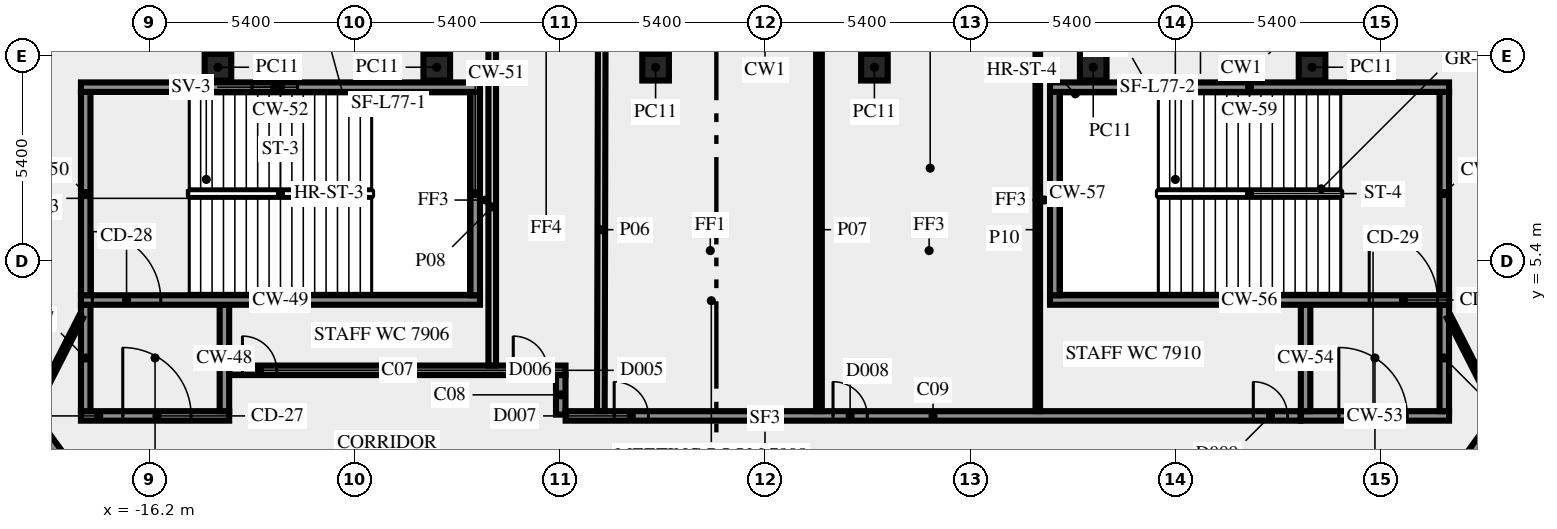
"""IFC4 building model, lengths in metres.
Left out: names, types, materials, properties, quantities, classifications, styles, units other than length and angle.
Written with IfcOpenShell. Run it as: python <this file> out.ifc"""

import sys

from ifc_helpers import new_model, si_unit, direction, frame, frame_2d, origin, origin_2d, place, context, subcontext, project, spatial, rectangle, extrude, element, fill, save


model = new_model("IFC4")
c1 = context("Model", 3, precision=1e-05, world=origin(), true_north=direction((0.0, 1.0)))
c2 = subcontext(c1, "Body", "Model", "MODEL_VIEW")
j1 = project(units=[si_unit("LENGTHUNIT", "METRE"), si_unit("PLANEANGLEUNIT", "RADIAN")], contexts=[c1])
p1 = place(None, origin())
s1 = spatial("IfcSite", under=j1, at=p1, CompositionType="ELEMENT")
p2 = place(p1, origin())
s2 = spatial("IfcBuilding", under=s1, at=p2, CompositionType="ELEMENT")
p3 = place(p2, frame((0.0, 0.0, 339.0)))
s3 = spatial("IfcBuildingStorey", under=s2, at=p3, CompositionType="ELEMENT", Elevation=339.0)
for number, where, z_axis, x_axis in (
    (1, (14.395, 10.5, 0.0), (0.0, 0.0, 1.0), (-1.0, 0.0, 0.0)),
    (2, (8.637, 10.5, 0.0), (0.0, 0.0, 1.0), (-1.0, 0.0, 0.0)),
    (3, (2.879, 10.5, 0.0), (0.0, 0.0, 1.0), (-1.0, 0.0, 0.0)),
    (4, (-2.879, 10.5, 0.0), (0.0, 0.0, 1.0), (-1.0, 0.0, 0.0)),
    (5, (-8.637, 10.5, 0.0), (0.0, 0.0, 1.0), (-1.0, 0.0, 0.0)),
    (6, (-14.395, 10.5, 0.0), (0.0, 0.0, 1.0), (-1.0, 0.0, 0.0)),
):
    element("IfcColumn", number, at=place(p3, frame(where, z_axis=z_axis, x_axis=x_axis)), inside=s3, PredefinedType="COLUMN", context=c2, shape_type="SweptSolid", body=[
        extrude(rectangle(XDim=0.7, YDim=0.7, at=origin_2d()), origin(), (0.0, 0.0, 1.0), 3.65),
    ])
p4 = place(p3, frame((-18.0, 1.325, 0.0), z_axis=(0.0, 0.0, 1.0), x_axis=(1.0, 0.0, 0.0)))
e7 = element("IfcWall", 7, at=p4, inside=s3, PredefinedType="SHEAR", context=c2, shape_type="SweptSolid", body=[
    extrude(rectangle(XDim=3.9, YDim=0.25, at=frame_2d((1.95, 0.0))), origin(), (0.0, 0.0, 1.0), 3.65),
])
p5 = place(p4, frame((1.1, 0.0, 0.0)))
e8 = element("IfcOpeningElement", 8, at=p5, cuts=e7, PredefinedType="OPENING", context=c2, shape_type="SweptSolid", body=[
    extrude(rectangle(XDim=1.8, YDim=2.1, at=frame_2d((0.9, 1.05))), frame((0.0, 0.135, 0.0), z_axis=(0.0, -1.0, 0.0), x_axis=(1.0, 0.0, 0.0)), (0.0, 0.0, 1.0), 0.27),
])
for number, where, z_axis, x_axis in (
    (9, (-17.875, 1.45, 0.0), (0.0, 0.0, 1.0), (0.0, 1.0, 0.0)),
    (10, (-14.225, 1.45, 0.0), (0.0, 0.0, 1.0), (0.0, 1.0, 0.0)),
):
    element("IfcWall", number, at=place(p3, frame(where, z_axis=z_axis, x_axis=x_axis)), inside=s3, PredefinedType="SHEAR", context=c2, shape_type="SweptSolid", body=[
        extrude(rectangle(XDim=2.8, YDim=0.25, at=frame_2d((1.4, 0.0))), origin(), (0.0, 0.0, 1.0), 3.65),
    ])
p6 = place(p3, frame((-18.0, 4.375, 0.0), z_axis=(0.0, 0.0, 1.0), x_axis=(1.0, 0.0, 0.0)))
e11 = element("IfcWall", 11, at=p6, inside=s3, PredefinedType="SHEAR", context=c2, shape_type="SweptSolid", body=[
    extrude(rectangle(XDim=10.5, YDim=0.25, at=frame_2d((5.25, 0.0))), origin(), (0.0, 0.0, 1.0), 3.65),
])
p7 = place(p6, frame((0.3, 0.0, 0.0)))
e12 = element("IfcOpeningElement", 12, at=p7, cuts=e11, PredefinedType="OPENING", context=c2, shape_type="SweptSolid", body=[
    extrude(rectangle(XDim=1.8, YDim=2.1, at=frame_2d((0.9, 1.05))), frame((0.0, 0.135, 0.0), z_axis=(0.0, -1.0, 0.0), x_axis=(1.0, 0.0, 0.0)), (0.0, 0.0, 1.0), 0.27),
])
for number, where, z_axis, x_axis in (
    (13, (-17.875, 4.5, 0.0), (0.0, 0.0, 1.0), (0.0, 1.0, 0.0)),
    (14, (-7.625, 4.5, 0.0), (0.0, 0.0, 1.0), (0.0, 1.0, 0.0)),
):
    element("IfcWall", number, at=place(p3, frame(where, z_axis=z_axis, x_axis=x_axis)), inside=s3, PredefinedType="SHEAR", context=c2, shape_type="SweptSolid", body=[
        extrude(rectangle(XDim=5.35, YDim=0.25, at=frame_2d((2.675, 0.0))), origin(), (0.0, 0.0, 1.0), 3.65),
    ])
p8 = place(p3, frame((-18.0, 9.975, 0.0), z_axis=(0.0, 0.0, 1.0), x_axis=(1.0, 0.0, 0.0)))
e15 = element("IfcWall", 15, at=p8, inside=s3, PredefinedType="SHEAR", context=c2, shape_type="SweptSolid", body=[
    extrude(rectangle(XDim=10.5, YDim=0.25, at=frame_2d((5.25, 0.0))), origin(), (0.0, 0.0, 1.0), 3.65),
])
p9 = place(p8, frame((4.5, 0.0, 1.0)))
e16 = element("IfcOpeningElement", 16, at=p9, cuts=e15, PredefinedType="OPENING", context=c2, shape_type="SweptSolid", body=[
    extrude(rectangle(XDim=1.2, YDim=1.2, at=frame_2d((0.6, 0.6))), frame((0.0, 0.135, 0.0), z_axis=(0.0, -1.0, 0.0), x_axis=(1.0, 0.0, 0.0)), (0.0, 0.0, 1.0), 0.27),
])
p10 = place(p3, frame((14.1, 1.325, 0.0), z_axis=(0.0, 0.0, 1.0), x_axis=(1.0, 0.0, 0.0)))
e17 = element("IfcWall", 17, at=p10, inside=s3, PredefinedType="SHEAR", context=c2, shape_type="SweptSolid", body=[
    extrude(rectangle(XDim=3.9, YDim=0.25, at=frame_2d((1.95, 0.0))), origin(), (0.0, 0.0, 1.0), 3.65),
])
p11 = place(p10, frame((1.0, 0.0, 0.0)))
e18 = element("IfcOpeningElement", 18, at=p11, cuts=e17, PredefinedType="OPENING", context=c2, shape_type="SweptSolid", body=[
    extrude(rectangle(XDim=1.8, YDim=2.1, at=frame_2d((0.9, 1.05))), frame((0.0, 0.135, 0.0), z_axis=(0.0, -1.0, 0.0), x_axis=(1.0, 0.0, 0.0)), (0.0, 0.0, 1.0), 0.27),
])
for number, where, z_axis, x_axis in (
    (19, (14.225, 1.45, 0.0), (0.0, 0.0, 1.0), (0.0, 1.0, 0.0)),
    (20, (17.875, 1.45, 0.0), (0.0, 0.0, 1.0), (0.0, 1.0, 0.0)),
):
    element("IfcWall", number, at=place(p3, frame(where, z_axis=z_axis, x_axis=x_axis)), inside=s3, PredefinedType="SHEAR", context=c2, shape_type="SweptSolid", body=[
        extrude(rectangle(XDim=2.8, YDim=0.25, at=frame_2d((1.4, 0.0))), origin(), (0.0, 0.0, 1.0), 3.65),
    ])
p12 = place(p3, frame((7.5, 4.375, 0.0), z_axis=(0.0, 0.0, 1.0), x_axis=(1.0, 0.0, 0.0)))
e21 = element("IfcWall", 21, at=p12, inside=s3, PredefinedType="SHEAR", context=c2, shape_type="SweptSolid", body=[
    extrude(rectangle(XDim=10.5, YDim=0.25, at=frame_2d((5.25, 0.0))), origin(), (0.0, 0.0, 1.0), 3.65),
])
p13 = place(p12, frame((8.4, 0.0, 0.0)))
e22 = element("IfcOpeningElement", 22, at=p13, cuts=e21, PredefinedType="OPENING", context=c2, shape_type="SweptSolid", body=[
    extrude(rectangle(XDim=1.8, YDim=2.1, at=frame_2d((0.9, 1.05))), frame((0.0, 0.135, 0.0), z_axis=(0.0, -1.0, 0.0), x_axis=(1.0, 0.0, 0.0)), (0.0, 0.0, 1.0), 0.27),
])
for number, where, z_axis, x_axis in (
    (23, (7.625, 4.5, 0.0), (0.0, 0.0, 1.0), (0.0, 1.0, 0.0)),
    (24, (17.875, 4.5, 0.0), (0.0, 0.0, 1.0), (0.0, 1.0, 0.0)),
):
    element("IfcWall", number, at=place(p3, frame(where, z_axis=z_axis, x_axis=x_axis)), inside=s3, PredefinedType="SHEAR", context=c2, shape_type="SweptSolid", body=[
        extrude(rectangle(XDim=5.35, YDim=0.25, at=frame_2d((2.675, 0.0))), origin(), (0.0, 0.0, 1.0), 3.65),
    ])
p14 = place(p3, frame((7.5, 9.975, 0.0), z_axis=(0.0, 0.0, 1.0), x_axis=(1.0, 0.0, 0.0)))
e25 = element("IfcWall", 25, at=p14, inside=s3, PredefinedType="SHEAR", context=c2, shape_type="SweptSolid", body=[
    extrude(rectangle(XDim=10.5, YDim=0.25, at=frame_2d((5.25, 0.0))), origin(), (0.0, 0.0, 1.0), 3.65),
])
p15 = place(p14, frame((2.0, 0.0, 1.0)))
e26 = element("IfcOpeningElement", 26, at=p15, cuts=e25, PredefinedType="OPENING", context=c2, shape_type="SweptSolid", body=[
    extrude(rectangle(XDim=1.2, YDim=1.2, at=frame_2d((0.6, 0.6))), frame((0.0, 0.135, 0.0), z_axis=(0.0, -1.0, 0.0), x_axis=(1.0, 0.0, 0.0)), (0.0, 0.0, 1.0), 0.27),
])
p16 = place(p3, frame((17.545, -1.125, 0.0), z_axis=(0.0, 0.0, 1.0), x_axis=(0.58779555165, 0.809009511354, 0.0)))
e27 = element("IfcWall", 27, at=p16, inside=s3, PredefinedType="SOLIDWALL", context=c2, shape_type="SweptSolid", body=[
    extrude(rectangle(XDim=18.103, YDim=0.25, at=frame_2d((9.052, 0.0))), origin(), (0.0, 0.0, 1.0), 3.65),
])
p17 = place(p16, frame((16.728, 0.0, 0.0)))
e28 = element("IfcOpeningElement", 28, at=p17, cuts=e27, PredefinedType="OPENING", context=c2, shape_type="SweptSolid", body=[
    extrude(rectangle(XDim=0.9, YDim=2.1, at=frame_2d((0.45, 1.05))), frame((0.0, 0.135, 0.0), z_axis=(0.0, -1.0, 0.0), x_axis=(1.0, 0.0, 0.0)), (0.0, 0.0, 1.0), 0.27),
])
p18 = place(p3, frame((-28.039, 13.319, 0.0), z_axis=(0.0, 0.0, 1.0), x_axis=(0.587791911753, -0.809012155952, 0.0)))
e29 = element("IfcWall", 29, at=p18, inside=s3, PredefinedType="SOLIDWALL", context=c2, shape_type="SweptSolid", body=[
    extrude(rectangle(XDim=17.853, YDim=0.25, at=frame_2d((8.927, 0.0))), origin(), (0.0, 0.0, 1.0), 3.65),
])
p19 = place(p18, frame((0.225, 0.0, 0.0)))
e30 = element("IfcOpeningElement", 30, at=p19, cuts=e29, PredefinedType="OPENING", context=c2, shape_type="SweptSolid", body=[
    extrude(rectangle(XDim=0.9, YDim=2.1, at=frame_2d((0.45, 1.05))), frame((0.0, 0.135, 0.0), z_axis=(0.0, -1.0, 0.0), x_axis=(1.0, 0.0, 0.0)), (0.0, 0.0, 1.0), 0.27),
])
p20 = place(p3, frame((-14.09, 2.525, 0.0), z_axis=(0.0, 0.0, 1.0), x_axis=(1.0, 0.0, 0.0)))
e31 = element("IfcWall", 31, at=p20, inside=s3, PredefinedType="SOLIDWALL", context=c2, shape_type="SweptSolid", body=[
    extrude(rectangle(XDim=8.84, YDim=0.25, at=frame_2d((4.42, 0.0))), origin(), (0.0, 0.0, 1.0), 3.65),
])
p21 = place(p20, frame((7.466, 0.0, 0.0)))
e32 = element("IfcOpeningElement", 32, at=p21, cuts=e31, PredefinedType="OPENING", context=c2, shape_type="SweptSolid", body=[
    extrude(rectangle(XDim=0.9, YDim=2.1, at=frame_2d((0.45, 1.05))), frame((0.0, 0.135, 0.0), z_axis=(0.0, -1.0, 0.0), x_axis=(1.0, 0.0, 0.0)), (0.0, 0.0, 1.0), 0.27),
])
p22 = place(p20, frame((0.34, 0.0, 0.0)))
e33 = element("IfcOpeningElement", 33, at=p22, cuts=e31, PredefinedType="OPENING", context=c2, shape_type="SweptSolid", body=[
    extrude(rectangle(XDim=0.9, YDim=2.1, at=frame_2d((0.45, 1.05))), frame((0.0, 0.135, 0.0), z_axis=(0.0, -1.0, 0.0), x_axis=(1.0, 0.0, 0.0)), (0.0, 0.0, 1.0), 0.27),
])
p23 = place(p3, frame((-5.375, 2.4, 0.0), z_axis=(0.0, 0.0, 1.0), x_axis=(0.0, -1.0, 0.0)))
e34 = element("IfcWall", 34, at=p23, inside=s3, PredefinedType="SOLIDWALL", context=c2, shape_type="SweptSolid", body=[
    extrude(rectangle(XDim=1.041, YDim=0.25, at=frame_2d((0.521, 0.0))), origin(), (0.0, 0.0, 1.0), 3.65),
])
p24 = place(p3, frame((-5.246, 1.325, 0.0), z_axis=(0.0, 0.0, 1.0), x_axis=(1.0, 0.0, 0.0)))
e35 = element("IfcWall", 35, at=p24, inside=s3, PredefinedType="SOLIDWALL", context=c2, shape_type="SweptSolid", body=[
    extrude(rectangle(XDim=19.336, YDim=0.25, at=frame_2d((9.668, 0.0))), origin(), (0.0, 0.0, 1.0), 3.65),
])
p25 = place(p24, frame((1.277, 0.0, 0.0)))
e36 = element("IfcOpeningElement", 36, at=p25, cuts=e35, PredefinedType="OPENING", context=c2, shape_type="SweptSolid", body=[
    extrude(rectangle(XDim=0.9, YDim=2.1, at=frame_2d((0.45, 1.05))), frame((0.0, 0.135, 0.0), z_axis=(0.0, -1.0, 0.0), x_axis=(1.0, 0.0, 0.0)), (0.0, 0.0, 1.0), 0.27),
])
p26 = place(p24, frame((7.036, 0.0, 0.0)))
e37 = element("IfcOpeningElement", 37, at=p26, cuts=e35, PredefinedType="OPENING", context=c2, shape_type="SweptSolid", body=[
    extrude(rectangle(XDim=0.9, YDim=2.1, at=frame_2d((0.45, 1.05))), frame((0.0, 0.135, 0.0), z_axis=(0.0, -1.0, 0.0), x_axis=(1.0, 0.0, 0.0)), (0.0, 0.0, 1.0), 0.27),
])
p27 = place(p24, frame((18.096, 0.0, 0.0)))
e38 = element("IfcOpeningElement", 38, at=p27, cuts=e35, PredefinedType="OPENING", context=c2, shape_type="SweptSolid", body=[
    extrude(rectangle(XDim=0.9, YDim=2.1, at=frame_2d((0.45, 1.05))), frame((0.0, 0.135, 0.0), z_axis=(0.0, -1.0, 0.0), x_axis=(1.0, 0.0, 0.0)), (0.0, 0.0, 1.0), 0.27),
])
p28 = place(p3, frame((-4.296, 11.0, 0.0), z_axis=(0.0, 0.0, 1.0), x_axis=(-0.002377476217, -0.999997173799, 0.0)))
e39 = element("IfcWall", 39, at=p28, inside=s3, PredefinedType="SOLIDWALL", context=c2, shape_type="SweptSolid", body=[
    extrude(rectangle(XDim=9.55, YDim=0.2, at=frame_2d((4.775, 0.0))), origin(), (0.0, 0.0, 1.0), 2.95),
])
p29 = place(p3, frame((1.42, 1.45, 0.0), z_axis=(0.0, 0.0, 1.0), x_axis=(0.0, 1.0, 0.0)))
e40 = element("IfcWall", 40, at=p29, inside=s3, PredefinedType="PARTITIONING", context=c2, shape_type="SweptSolid", body=[
    extrude(rectangle(XDim=9.55, YDim=0.15, at=frame_2d((4.775, 0.0))), origin(), (0.0, 0.0, 1.0), 2.95),
])
p30 = place(p3, frame((-7.178, 11.0, 0.0), z_axis=(0.0, 0.0, 1.0), x_axis=(0.0, -1.0, 0.0)))
e41 = element("IfcWall", 41, at=p30, inside=s3, PredefinedType="SOLIDWALL", context=c2, shape_type="SweptSolid", body=[
    extrude(rectangle(XDim=8.35, YDim=0.2, at=frame_2d((4.175, 0.0))), origin(), (0.0, 0.0, 1.0), 2.95),
])
p31 = place(p3, frame((7.178, 1.45, 0.0), z_axis=(0.0, 0.0, 1.0), x_axis=(0.0, 1.0, 0.0)))
e42 = element("IfcWall", 42, at=p31, inside=s3, PredefinedType="PARTITIONING", context=c2, shape_type="SweptSolid", body=[
    extrude(rectangle(XDim=9.55, YDim=0.12, at=frame_2d((4.775, 0.0))), origin(), (0.0, 0.0, 1.0), 2.95),
])
for number, where, z_axis, x_axis in (
    (43, (18.0, 3.925, 0.0), (0.0, 0.0, 1.0), (0.454, -0.891, 0.0)),
    (44, (-19.261, 1.45, 0.0), (0.0, 0.0, 1.0), (0.454, 0.891, 0.0)),
):
    element("IfcWall", number, at=place(p3, frame(where, z_axis=z_axis, x_axis=x_axis)), inside=s3, PredefinedType="PARTITIONING", context=c2, shape_type="SweptSolid", body=[
        extrude(rectangle(XDim=2.778, YDim=0.12, at=frame_2d((1.389, 0.0))), origin(), (0.0, 0.0, 1.0), 3.65),
    ])
p32 = place(p5, origin())
e45 = element("IfcDoor", 45, at=p32, inside=s3, OperationType="DOUBLE_DOOR_SINGLE_SWING", PredefinedType="DOOR", context=c2, shape_type="SweptSolid", body=[
    extrude(rectangle(XDim=1.8, YDim=2.1, at=frame_2d((0.9, 1.05))), frame((0.0, 0.025, 0.0), z_axis=(0.0, -1.0, 0.0), x_axis=(1.0, 0.0, 0.0)), (0.0, 0.0, 1.0), 0.05),
])
fill(e8, e45)
p33 = place(p7, origin())
e46 = element("IfcDoor", 46, at=p33, inside=s3, OperationType="DOUBLE_DOOR_SINGLE_SWING", PredefinedType="DOOR", context=c2, shape_type="SweptSolid", body=[
    extrude(rectangle(XDim=1.8, YDim=2.1, at=frame_2d((0.9, 1.05))), frame((0.0, 0.025, 0.0), z_axis=(0.0, -1.0, 0.0), x_axis=(1.0, 0.0, 0.0)), (0.0, 0.0, 1.0), 0.05),
])
fill(e12, e46)
p34 = place(p9, origin())
e47 = element("IfcWindow", 47, at=p34, inside=s3, PartitioningType="SINGLE_PANEL", PredefinedType="WINDOW", context=c2, shape_type="SweptSolid", body=[
    extrude(rectangle(XDim=1.2, YDim=1.2, at=frame_2d((0.6, 0.6))), frame((0.0, 0.03, 0.0), z_axis=(0.0, -1.0, 0.0), x_axis=(1.0, 0.0, 0.0)), (0.0, 0.0, 1.0), 0.06),
])
fill(e16, e47)
p35 = place(p11, origin())
e48 = element("IfcDoor", 48, at=p35, inside=s3, OperationType="DOUBLE_DOOR_SINGLE_SWING", PredefinedType="DOOR", context=c2, shape_type="SweptSolid", body=[
    extrude(rectangle(XDim=1.8, YDim=2.1, at=frame_2d((0.9, 1.05))), frame((0.0, 0.025, 0.0), z_axis=(0.0, -1.0, 0.0), x_axis=(1.0, 0.0, 0.0)), (0.0, 0.0, 1.0), 0.05),
])
fill(e18, e48)
p36 = place(p13, origin())
e49 = element("IfcDoor", 49, at=p36, inside=s3, OperationType="DOUBLE_DOOR_SINGLE_SWING", PredefinedType="DOOR", context=c2, shape_type="SweptSolid", body=[
    extrude(rectangle(XDim=1.8, YDim=2.1, at=frame_2d((0.9, 1.05))), frame((0.0, 0.025, 0.0), z_axis=(0.0, -1.0, 0.0), x_axis=(1.0, 0.0, 0.0)), (0.0, 0.0, 1.0), 0.05),
])
fill(e22, e49)
p37 = place(p15, origin())
e50 = element("IfcWindow", 50, at=p37, inside=s3, PartitioningType="SINGLE_PANEL", PredefinedType="WINDOW", context=c2, shape_type="SweptSolid", body=[
    extrude(rectangle(XDim=1.2, YDim=1.2, at=frame_2d((0.6, 0.6))), frame((0.0, 0.03, 0.0), z_axis=(0.0, -1.0, 0.0), x_axis=(1.0, 0.0, 0.0)), (0.0, 0.0, 1.0), 0.06),
])
fill(e26, e50)
p38 = place(p25, origin())
e51 = element("IfcDoor", 51, at=p38, inside=s3, OperationType="SINGLE_SWING_LEFT", PredefinedType="DOOR", context=c2, shape_type="SweptSolid", body=[
    extrude(rectangle(XDim=0.9, YDim=2.1, at=frame_2d((0.45, 1.05))), frame((0.0, 0.025, 0.0), z_axis=(0.0, -1.0, 0.0), x_axis=(1.0, 0.0, 0.0)), (0.0, 0.0, 1.0), 0.05),
])
fill(e36, e51)
p39 = place(p21, origin())
e52 = element("IfcDoor", 52, at=p39, inside=s3, OperationType="SINGLE_SWING_RIGHT", PredefinedType="DOOR", context=c2, shape_type="SweptSolid", body=[
    extrude(rectangle(XDim=0.9, YDim=2.1, at=frame_2d((0.45, 1.05))), frame((0.0, 0.025, 0.0), z_axis=(0.0, -1.0, 0.0), x_axis=(1.0, 0.0, 0.0)), (0.0, 0.0, 1.0), 0.05),
])
fill(e32, e52)
p40 = place(p26, origin())
e53 = element("IfcDoor", 53, at=p40, inside=s3, OperationType="SINGLE_SWING_LEFT", PredefinedType="DOOR", context=c2, shape_type="SweptSolid", body=[
    extrude(rectangle(XDim=0.9, YDim=2.1, at=frame_2d((0.45, 1.05))), frame((0.0, 0.025, 0.0), z_axis=(0.0, -1.0, 0.0), x_axis=(1.0, 0.0, 0.0)), (0.0, 0.0, 1.0), 0.05),
])
fill(e37, e53)
p41 = place(p22, origin())
e54 = element("IfcDoor", 54, at=p41, inside=s3, OperationType="SINGLE_SWING_LEFT", PredefinedType="DOOR", context=c2, shape_type="SweptSolid", body=[
    extrude(rectangle(XDim=0.9, YDim=2.1, at=frame_2d((0.45, 1.05))), frame((0.0, 0.025, 0.0), z_axis=(0.0, -1.0, 0.0), x_axis=(1.0, 0.0, 0.0)), (0.0, 0.0, 1.0), 0.05),
])
fill(e33, e54)
p42 = place(p27, origin())
e55 = element("IfcDoor", 55, at=p42, inside=s3, OperationType="SINGLE_SWING_RIGHT", PredefinedType="DOOR", context=c2, shape_type="SweptSolid", body=[
    extrude(rectangle(XDim=0.9, YDim=2.1, at=frame_2d((0.45, 1.05))), frame((0.0, 0.025, 0.0), z_axis=(0.0, -1.0, 0.0), x_axis=(1.0, 0.0, 0.0)), (0.0, 0.0, 1.0), 0.05),
])
fill(e38, e55)
save(model, sys.argv[1])
